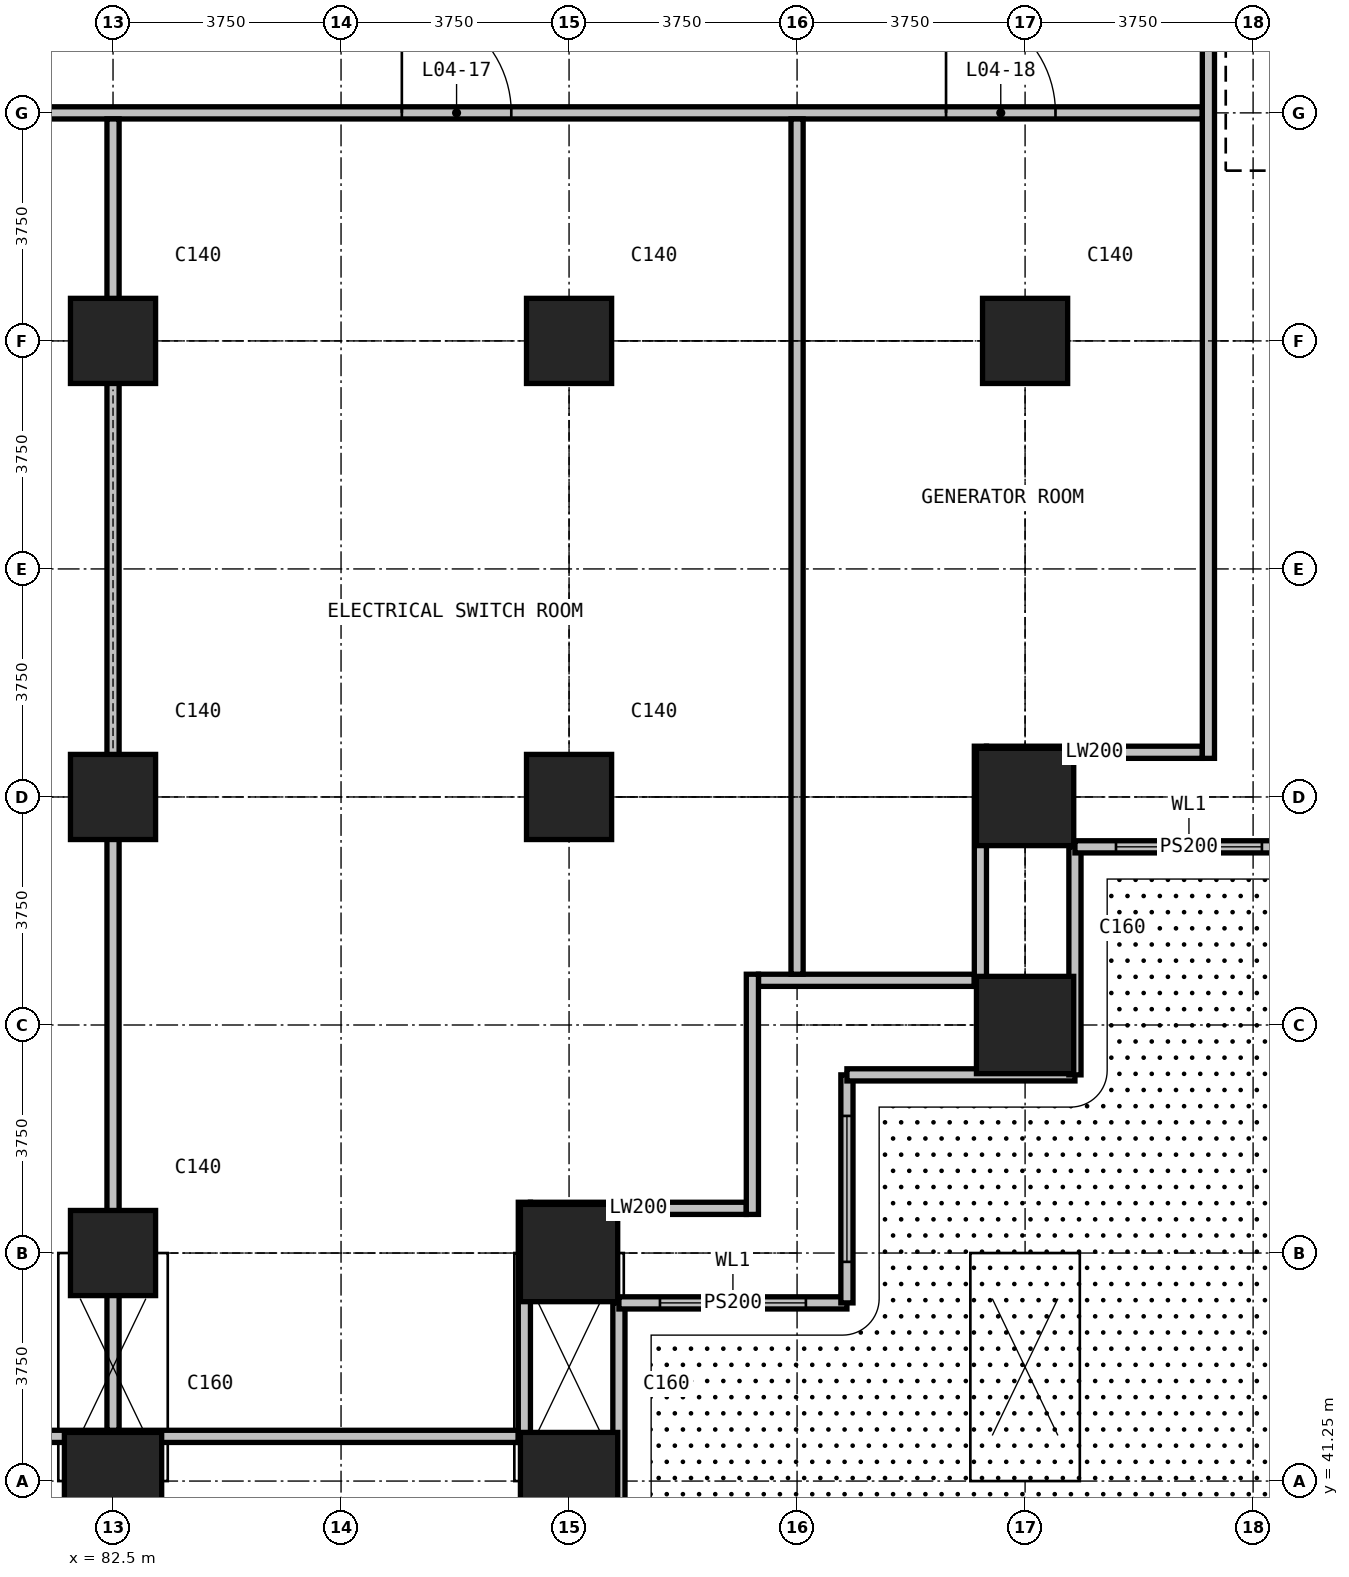
"""IFC4 building model, lengths in metres.
Left out: names, types, materials, properties, quantities, classifications, styles, units other than length and angle.
Written with IfcOpenShell. Run it as: python <this file> out.ifc"""

import sys

from ifc_helpers import new_model, si_unit, direction, frame, frame_2d, origin, origin_2d, place, context, subcontext, project, spatial, rectangle, extrude, element, fill, save


model = new_model("IFC4")
c1 = context("Model", 3, precision=1e-05, world=origin(), true_north=direction((0.0, 1.0)))
c2 = subcontext(c1, "Body", "Model", "MODEL_VIEW")
j1 = project(units=[si_unit("LENGTHUNIT", "METRE"), si_unit("PLANEANGLEUNIT", "RADIAN")], contexts=[c1])
p1 = place(None, origin())
s1 = spatial("IfcSite", under=j1, at=p1, CompositionType="ELEMENT")
p2 = place(p1, origin())
s2 = spatial("IfcBuilding", under=s1, at=p2, CompositionType="ELEMENT")
p3 = place(p2, frame((0.0, 0.0, 30.0)))
s3 = spatial("IfcBuildingStorey", under=s2, at=p3, CompositionType="ELEMENT", Elevation=30.0)
p4 = place(p3, frame((82.5, 41.25, 0.0), z_axis=(0.0, 0.0, 1.0), x_axis=(1.0, 0.0, 0.0)))
e1 = element("IfcColumn", 1, at=p4, inside=s3, PredefinedType="COLUMN", context=c2, shape_type="SweptSolid", body=[
    extrude(rectangle(XDim=1.6, YDim=1.6, at=origin_2d()), origin(), (0.0, 0.0, 1.0), 5.0),
])
for number, where, z_axis, x_axis in (
    (2, (82.5, 45.0, 0.0), (0.0, 0.0, 1.0), (1.0, 0.0, 0.0)),
    (3, (82.5, 52.5, 0.0), (0.0, 0.0, 1.0), (1.0, 0.0, 0.0)),
    (4, (82.5, 60.0, 0.0), (0.0, 0.0, 1.0), (1.0, 0.0, 0.0)),
):
    element("IfcColumn", number, at=place(p3, frame(where, z_axis=z_axis, x_axis=x_axis)), inside=s3, PredefinedType="COLUMN", context=c2, shape_type="SweptSolid", body=[
        extrude(rectangle(XDim=1.4, YDim=1.4, at=origin_2d()), origin(), (0.0, 0.0, 1.0), 5.0),
    ])
for number, where, z_axis, x_axis in (
    (5, (90.0, 41.25, 0.0), (0.0, 0.0, 1.0), (1.0, 0.0, 0.0)),
    (6, (90.0, 45.0, 0.0), (0.0, 0.0, 1.0), (1.0, 0.0, 0.0)),
):
    element("IfcColumn", number, at=place(p3, frame(where, z_axis=z_axis, x_axis=x_axis)), inside=s3, PredefinedType="COLUMN", context=c2, shape_type="SweptSolid", body=[
        extrude(rectangle(XDim=1.6, YDim=1.6, at=origin_2d()), origin(), (0.0, 0.0, 1.0), 5.0),
    ])
for number, where, z_axis, x_axis in (
    (7, (90.0, 52.5, 0.0), (0.0, 0.0, 1.0), (1.0, 0.0, 0.0)),
    (8, (90.0, 60.0, 0.0), (0.0, 0.0, 1.0), (1.0, 0.0, 0.0)),
):
    element("IfcColumn", number, at=place(p3, frame(where, z_axis=z_axis, x_axis=x_axis)), inside=s3, PredefinedType="COLUMN", context=c2, shape_type="SweptSolid", body=[
        extrude(rectangle(XDim=1.4, YDim=1.4, at=origin_2d()), origin(), (0.0, 0.0, 1.0), 5.0),
    ])
for number, where, z_axis, x_axis in (
    (9, (97.5, 48.75, 0.0), (0.0, 0.0, 1.0), (1.0, 0.0, 0.0)),
    (10, (97.5, 52.5, 0.0), (0.0, 0.0, 1.0), (1.0, 0.0, 0.0)),
):
    element("IfcColumn", number, at=place(p3, frame(where, z_axis=z_axis, x_axis=x_axis)), inside=s3, PredefinedType="COLUMN", context=c2, shape_type="SweptSolid", body=[
        extrude(rectangle(XDim=1.6, YDim=1.6, at=origin_2d()), origin(), (0.0, 0.0, 1.0), 5.0),
    ])
p5 = place(p3, frame((97.5, 60.0, 0.0), z_axis=(0.0, 0.0, 1.0), x_axis=(1.0, 0.0, 0.0)))
e11 = element("IfcColumn", 11, at=p5, inside=s3, PredefinedType="COLUMN", context=c2, shape_type="SweptSolid", body=[
    extrude(rectangle(XDim=1.4, YDim=1.4, at=origin_2d()), origin(), (0.0, 0.0, 1.0), 5.0),
])
p6 = place(p3, frame((90.82, 40.43, 0.0), z_axis=(0.0, 0.0, 1.0), x_axis=(0.0, 1.0, 0.0)))
e12 = element("IfcWall", 12, at=p6, inside=s3, PredefinedType="SOLIDWALL", context=c2, shape_type="SweptSolid", body=[
    extrude(rectangle(XDim=3.75, YDim=0.2, at=frame_2d((1.875, 0.0))), origin(), (0.0, 0.0, 1.0), 4.7),
])
p7 = place(p3, frame((90.82, 44.18, 0.0), z_axis=(0.0, 0.0, 1.0), x_axis=(1.0, 0.0, 0.0)))
e13 = element("IfcWall", 13, at=p7, inside=s3, PredefinedType="SOLIDWALL", context=c2, shape_type="SweptSolid", body=[
    extrude(rectangle(XDim=3.75, YDim=0.2, at=frame_2d((1.875, 0.0))), origin(), (0.0, 0.0, 1.0), 4.7),
])
p8 = place(p7, frame((0.675, 0.0, 1.0)))
e14 = element("IfcOpeningElement", 14, at=p8, cuts=e13, PredefinedType="OPENING", context=c2, shape_type="SweptSolid", body=[
    extrude(rectangle(XDim=2.4, YDim=3.0, at=frame_2d((1.2, 1.5))), frame((0.0, 0.11, 0.0), z_axis=(0.0, -1.0, 0.0), x_axis=(1.0, 0.0, 0.0)), (0.0, 0.0, 1.0), 0.22),
])
p9 = place(p3, frame((94.57, 44.18, 0.0), z_axis=(0.0, 0.0, 1.0), x_axis=(0.0, 1.0, 0.0)))
e15 = element("IfcWall", 15, at=p9, inside=s3, PredefinedType="SOLIDWALL", context=c2, shape_type="SweptSolid", body=[
    extrude(rectangle(XDim=3.75, YDim=0.2, at=frame_2d((1.875, 0.0))), origin(), (0.0, 0.0, 1.0), 4.7),
])
p10 = place(p9, frame((0.675, 0.0, 1.0)))
e16 = element("IfcOpeningElement", 16, at=p10, cuts=e15, PredefinedType="OPENING", context=c2, shape_type="SweptSolid", body=[
    extrude(rectangle(XDim=2.4, YDim=3.0, at=frame_2d((1.2, 1.5))), frame((0.0, 0.11, 0.0), z_axis=(0.0, -1.0, 0.0), x_axis=(1.0, 0.0, 0.0)), (0.0, 0.0, 1.0), 0.22),
])
for number, where, z_axis, x_axis in (
    (17, (94.57, 47.93, 0.0), (0.0, 0.0, 1.0), (1.0, 0.0, 0.0)),
    (18, (98.32, 47.93, 0.0), (0.0, 0.0, 1.0), (0.0, 1.0, 0.0)),
):
    element("IfcWall", number, at=place(p3, frame(where, z_axis=z_axis, x_axis=x_axis)), inside=s3, PredefinedType="SOLIDWALL", context=c2, shape_type="SweptSolid", body=[
        extrude(rectangle(XDim=3.75, YDim=0.2, at=frame_2d((1.875, 0.0))), origin(), (0.0, 0.0, 1.0), 4.7),
    ])
p11 = place(p3, frame((98.32, 51.68, 0.0), z_axis=(0.0, 0.0, 1.0), x_axis=(1.0, 0.0, 0.0)))
e19 = element("IfcWall", 19, at=p11, inside=s3, PredefinedType="SOLIDWALL", context=c2, shape_type="SweptSolid", body=[
    extrude(rectangle(XDim=3.75, YDim=0.2, at=frame_2d((1.875, 0.0))), origin(), (0.0, 0.0, 1.0), 4.7),
])
p12 = place(p11, frame((0.675, 0.0, 1.0)))
e20 = element("IfcOpeningElement", 20, at=p12, cuts=e19, PredefinedType="OPENING", context=c2, shape_type="SweptSolid", body=[
    extrude(rectangle(XDim=2.4, YDim=3.0, at=frame_2d((1.2, 1.5))), frame((0.0, 0.11, 0.0), z_axis=(0.0, -1.0, 0.0), x_axis=(1.0, 0.0, 0.0)), (0.0, 0.0, 1.0), 0.22),
])
p13 = place(p3, frame((60.835, 41.985, 0.0), z_axis=(0.0, 0.0, 1.0), x_axis=(1.0, 0.0, 0.0)))
e21 = element("IfcWall", 21, at=p13, inside=s3, PredefinedType="PARTITIONING", context=c2, shape_type="SweptSolid", body=[
    extrude(rectangle(XDim=28.33, YDim=0.2, at=frame_2d((14.165, 0.0))), origin(), (0.0, 0.0, 1.0), 4.7),
])
for number, where, z_axis, x_axis in (
    (22, (89.365, 45.735, 0.0), (0.0, 0.0, 1.0), (1.0, 0.0, 0.0)),
    (23, (93.115, 49.485, 0.0), (0.0, 0.0, 1.0), (1.0, 0.0, 0.0)),
    (24, (96.865, 53.235, 0.0), (0.0, 0.0, 1.0), (1.0, 0.0, 0.0)),
):
    element("IfcWall", number, at=place(p3, frame(where, z_axis=z_axis, x_axis=x_axis)), inside=s3, PredefinedType="PARTITIONING", context=c2, shape_type="SweptSolid", body=[
        extrude(rectangle(XDim=3.55, YDim=0.2, at=frame_2d((1.775, 0.0))), origin(), (0.0, 0.0, 1.0), 4.7),
    ])
p14 = place(p3, frame((49.585, 63.75, 0.0), z_axis=(0.0, 0.0, 1.0), x_axis=(1.0, 0.0, 0.0)))
e25 = element("IfcWall", 25, at=p14, inside=s3, PredefinedType="PARTITIONING", context=c2, shape_type="SweptSolid", body=[
    extrude(rectangle(XDim=50.83, YDim=0.2, at=frame_2d((25.415, 0.0))), origin(), (0.0, 0.0, 1.0), 4.7),
])
p15 = place(p14, frame((4.3, 0.0, 0.0)))
e26 = element("IfcOpeningElement", 26, at=p15, cuts=e25, PredefinedType="OPENING", context=c2, shape_type="SweptSolid", body=[
    extrude(rectangle(XDim=1.8, YDim=2.3, at=frame_2d((0.9, 1.15))), frame((0.0, 0.11, 0.0), z_axis=(0.0, -1.0, 0.0), x_axis=(1.0, 0.0, 0.0)), (0.0, 0.0, 1.0), 0.22),
])
p16 = place(p14, frame((15.115, 0.0, 0.0)))
e27 = element("IfcOpeningElement", 27, at=p16, cuts=e25, PredefinedType="OPENING", context=c2, shape_type="SweptSolid", body=[
    extrude(rectangle(XDim=1.8, YDim=2.3, at=frame_2d((0.9, 1.15))), frame((0.0, 0.11, 0.0), z_axis=(0.0, -1.0, 0.0), x_axis=(1.0, 0.0, 0.0)), (0.0, 0.0, 1.0), 0.22),
])
p17 = place(p14, frame((26.365, 0.0, 0.0)))
e28 = element("IfcOpeningElement", 28, at=p17, cuts=e25, PredefinedType="OPENING", context=c2, shape_type="SweptSolid", body=[
    extrude(rectangle(XDim=1.8, YDim=2.3, at=frame_2d((0.9, 1.15))), frame((0.0, 0.11, 0.0), z_axis=(0.0, -1.0, 0.0), x_axis=(1.0, 0.0, 0.0)), (0.0, 0.0, 1.0), 0.22),
])
p18 = place(p14, frame((37.665, 0.0, 0.0)))
e29 = element("IfcOpeningElement", 29, at=p18, cuts=e25, PredefinedType="OPENING", context=c2, shape_type="SweptSolid", body=[
    extrude(rectangle(XDim=1.8, YDim=2.3, at=frame_2d((0.9, 1.15))), frame((0.0, 0.11, 0.0), z_axis=(0.0, -1.0, 0.0), x_axis=(1.0, 0.0, 0.0)), (0.0, 0.0, 1.0), 0.22),
])
p19 = place(p14, frame((46.615, 0.0, 0.0)))
e30 = element("IfcOpeningElement", 30, at=p19, cuts=e25, PredefinedType="OPENING", context=c2, shape_type="SweptSolid", body=[
    extrude(rectangle(XDim=1.8, YDim=2.3, at=frame_2d((0.9, 1.15))), frame((0.0, 0.11, 0.0), z_axis=(0.0, -1.0, 0.0), x_axis=(1.0, 0.0, 0.0)), (0.0, 0.0, 1.0), 0.22),
])
p20 = place(p3, frame((82.5, 42.085, 0.0), z_axis=(0.0, 0.0, 1.0), x_axis=(0.0, 1.0, 0.0)))
e31 = element("IfcWall", 31, at=p20, inside=s3, PredefinedType="PARTITIONING", context=c2, shape_type="SweptSolid", body=[
    extrude(rectangle(XDim=21.565, YDim=0.2, at=frame_2d((10.782, 0.0))), origin(), (0.0, 0.0, 1.0), 4.7),
])
for number, where, z_axis, x_axis in (
    (32, (89.265, 41.885, 0.0), (0.0, 0.0, 1.0), (0.0, 1.0, 0.0)),
    (33, (93.015, 45.635, 0.0), (0.0, 0.0, 1.0), (0.0, 1.0, 0.0)),
):
    element("IfcWall", number, at=place(p3, frame(where, z_axis=z_axis, x_axis=x_axis)), inside=s3, PredefinedType="PARTITIONING", context=c2, shape_type="SweptSolid", body=[
        extrude(rectangle(XDim=3.95, YDim=0.2, at=frame_2d((1.975, 0.0))), origin(), (0.0, 0.0, 1.0), 4.7),
    ])
p21 = place(p3, frame((93.75, 49.585, 0.0), z_axis=(0.0, 0.0, 1.0), x_axis=(0.0, 1.0, 0.0)))
e34 = element("IfcWall", 34, at=p21, inside=s3, PredefinedType="PARTITIONING", context=c2, shape_type="SweptSolid", body=[
    extrude(rectangle(XDim=14.065, YDim=0.2, at=frame_2d((7.032, 0.0))), origin(), (0.0, 0.0, 1.0), 4.7),
])
p22 = place(p3, frame((96.765, 49.385, 0.0), z_axis=(0.0, 0.0, 1.0), x_axis=(0.0, 1.0, 0.0)))
e35 = element("IfcWall", 35, at=p22, inside=s3, PredefinedType="PARTITIONING", context=c2, shape_type="SweptSolid", body=[
    extrude(rectangle(XDim=3.95, YDim=0.2, at=frame_2d((1.975, 0.0))), origin(), (0.0, 0.0, 1.0), 4.7),
])
p23 = place(p3, frame((100.515, 53.135, 0.0), z_axis=(0.0, 0.0, 1.0), x_axis=(0.0, 1.0, 0.0)))
e36 = element("IfcWall", 36, at=p23, inside=s3, PredefinedType="PARTITIONING", context=c2, shape_type="SweptSolid", body=[
    extrude(rectangle(XDim=28.73, YDim=0.2, at=frame_2d((14.365, 0.0))), origin(), (0.0, 0.0, 1.0), 4.7),
])
p24 = place(p8, origin())
e37 = element("IfcWindow", 37, at=p24, inside=s3, PartitioningType="SINGLE_PANEL", PredefinedType="USERDEFINED", context=c2, shape_type="SweptSolid", body=[
    extrude(rectangle(XDim=2.4, YDim=3.0, at=frame_2d((1.2, 1.5))), frame((0.0, 0.03, 0.0), z_axis=(0.0, -1.0, 0.0), x_axis=(1.0, 0.0, 0.0)), (0.0, 0.0, 1.0), 0.06),
])
fill(e14, e37)
p25 = place(p10, origin())
e38 = element("IfcWindow", 38, at=p25, inside=s3, PartitioningType="SINGLE_PANEL", PredefinedType="USERDEFINED", context=c2, shape_type="SweptSolid", body=[
    extrude(rectangle(XDim=2.4, YDim=3.0, at=frame_2d((1.2, 1.5))), frame((0.0, 0.03, 0.0), z_axis=(0.0, -1.0, 0.0), x_axis=(1.0, 0.0, 0.0)), (0.0, 0.0, 1.0), 0.06),
])
fill(e16, e38)
p26 = place(p12, origin())
e39 = element("IfcWindow", 39, at=p26, inside=s3, PartitioningType="SINGLE_PANEL", PredefinedType="USERDEFINED", context=c2, shape_type="SweptSolid", body=[
    extrude(rectangle(XDim=2.4, YDim=3.0, at=frame_2d((1.2, 1.5))), frame((0.0, 0.03, 0.0), z_axis=(0.0, -1.0, 0.0), x_axis=(1.0, 0.0, 0.0)), (0.0, 0.0, 1.0), 0.06),
])
fill(e20, e39)
p27 = place(p3, frame((0.0, 0.0, -0.35)))
p28 = place(p27, frame((102.0, 64.0, 0.0)))
p29 = place(p28, frame((0.0, 0.0, 0.3)))
e40 = element("IfcWindow", 40, at=p29, inside=s3, PartitioningType="SINGLE_PANEL", PredefinedType="SKYLIGHT", context=c2, shape_type="SweptSolid", body=[
    extrude(rectangle(XDim=2.4, YDim=2.4, at=origin_2d()), origin(), (0.0, 0.0, 1.0), 0.05),
])
p30 = place(p18, origin())
e41 = element("IfcDoor", 41, at=p30, inside=s3, OperationType="DOUBLE_DOOR_SINGLE_SWING", PredefinedType="DOOR", context=c2, shape_type="SweptSolid", body=[
    extrude(rectangle(XDim=1.8, YDim=2.3, at=frame_2d((0.9, 1.15))), frame((0.0, 0.025, 0.0), z_axis=(0.0, -1.0, 0.0), x_axis=(1.0, 0.0, 0.0)), (0.0, 0.0, 1.0), 0.05),
])
fill(e29, e41)
p31 = place(p19, origin())
e42 = element("IfcDoor", 42, at=p31, inside=s3, OperationType="DOUBLE_DOOR_SINGLE_SWING", PredefinedType="DOOR", context=c2, shape_type="SweptSolid", body=[
    extrude(rectangle(XDim=1.8, YDim=2.3, at=frame_2d((0.9, 1.15))), frame((0.0, 0.025, 0.0), z_axis=(0.0, -1.0, 0.0), x_axis=(1.0, 0.0, 0.0)), (0.0, 0.0, 1.0), 0.05),
])
fill(e30, e42)
save(model, sys.argv[1])
